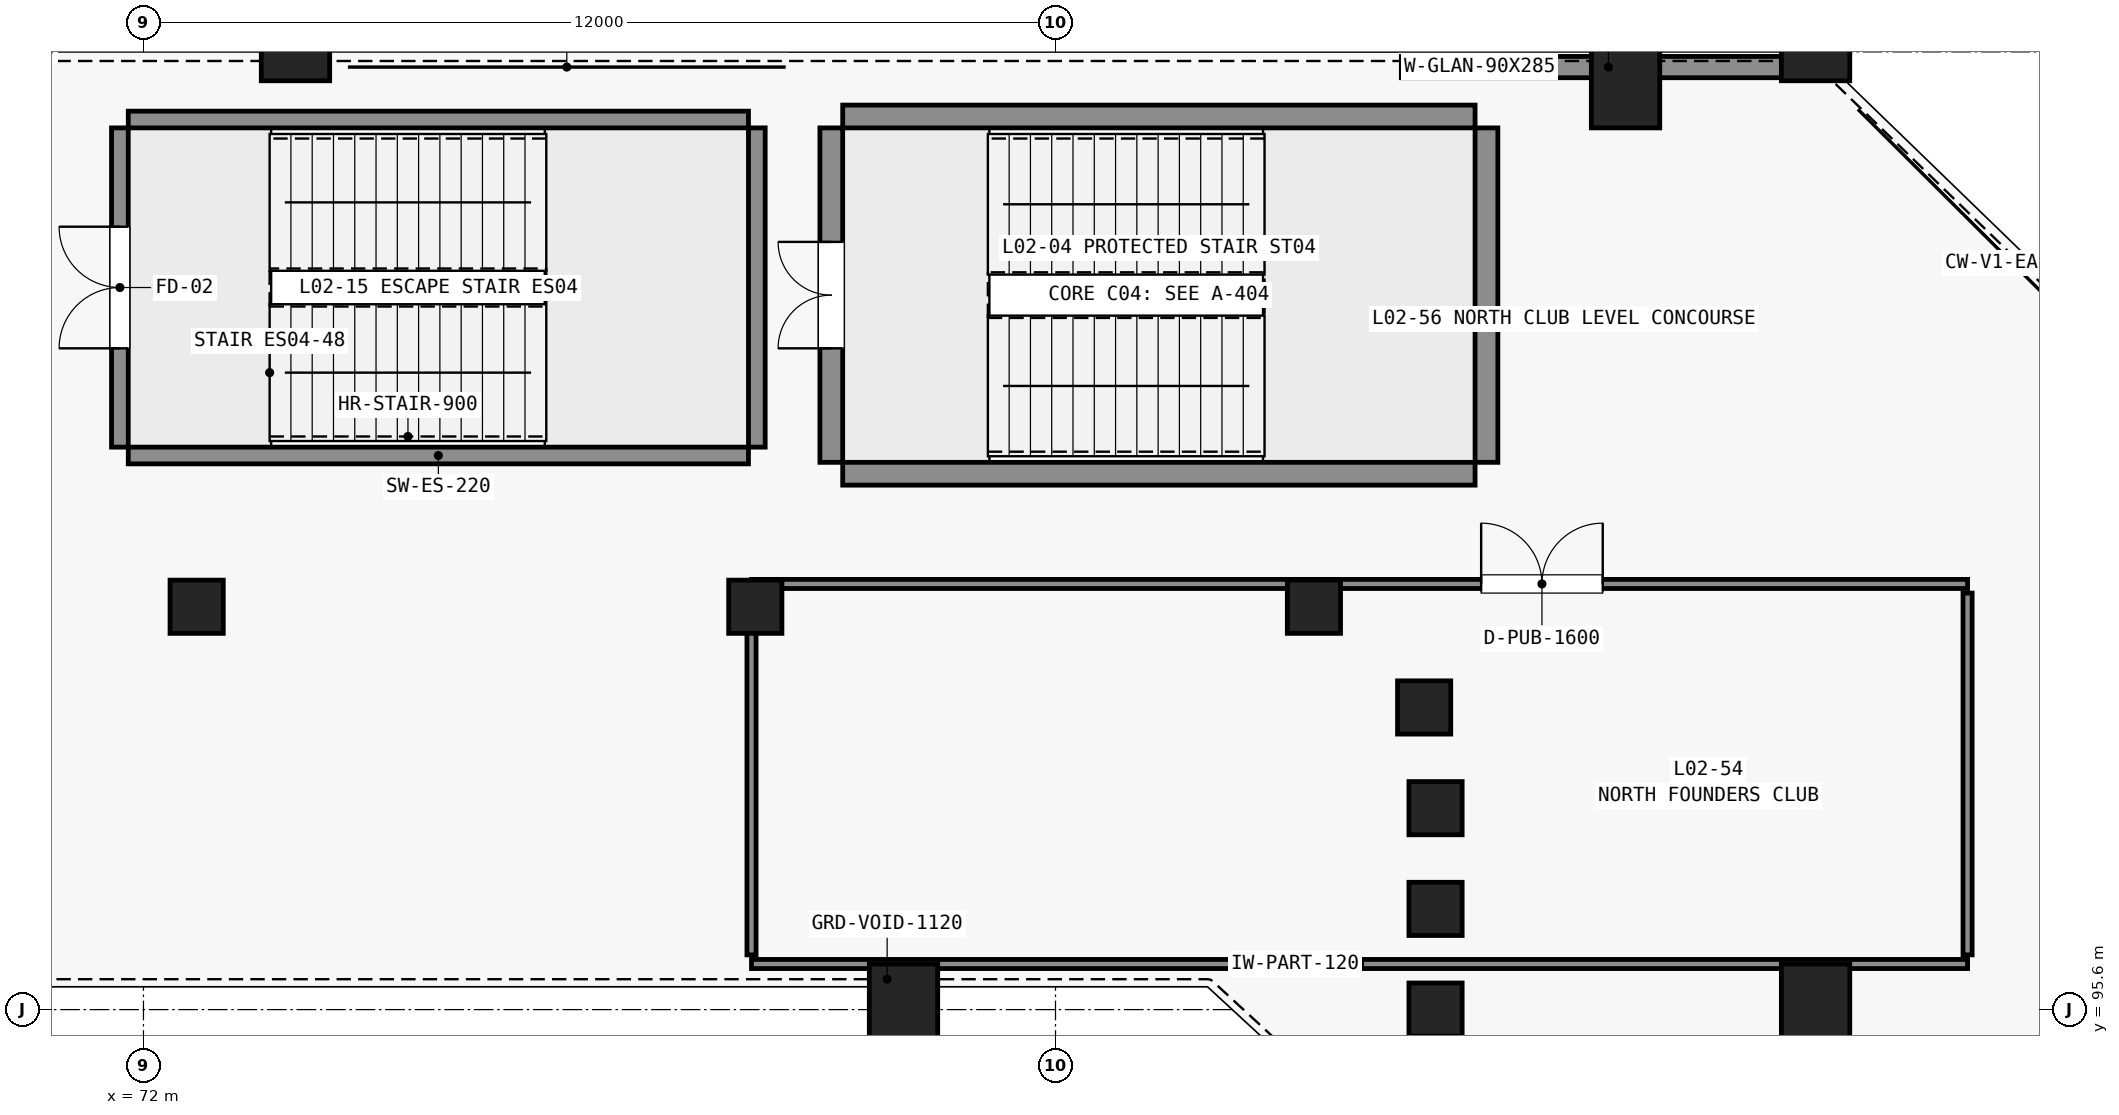
"""IFC4 building model, lengths in metres.
Left out: names, types, materials, properties, quantities, classifications, styles, units other than length and angle.
Written with IfcOpenShell. Run it as: python <this file> out.ifc"""

import sys

from ifc_helpers import new_model, si_unit, direction, frame, frame_2d, origin, origin_2d, place, context, subcontext, project, spatial, rectangle, extrude, element, fill, save


model = new_model("IFC4")
c1 = context("Model", 3, precision=1e-05, world=origin(), true_north=direction((0.0, 1.0)))
c2 = subcontext(c1, "Body", "Model", "MODEL_VIEW")
j1 = project(units=[si_unit("LENGTHUNIT", "METRE"), si_unit("PLANEANGLEUNIT", "RADIAN")], contexts=[c1])
p1 = place(None, origin())
s1 = spatial("IfcSite", under=j1, at=p1, CompositionType="ELEMENT")
p2 = place(p1, origin())
s2 = spatial("IfcBuilding", under=s1, at=p2, CompositionType="ELEMENT")
p3 = place(p2, frame((0.0, 0.0, 11.4)))
s3 = spatial("IfcBuildingStorey", under=s2, at=p3, CompositionType="ELEMENT", Elevation=11.4)
p4 = place(p3, frame((82.0, 95.6, 0.0), z_axis=(0.0, 0.0, 1.0), x_axis=(1.0, 0.0, 0.0)))
e1 = element("IfcColumn", 1, at=p4, inside=s3, PredefinedType="COLUMN", context=c2, shape_type="SweptSolid", body=[
    extrude(rectangle(XDim=0.9, YDim=1.2, at=origin_2d()), origin(), (0.0, 0.0, 1.0), 4.45),
])
p5 = place(p3, frame((94.0, 95.6, 0.0), z_axis=(0.0, 0.0, 1.0), x_axis=(1.0, 0.0, 0.0)))
e2 = element("IfcColumn", 2, at=p5, inside=s3, PredefinedType="COLUMN", context=c2, shape_type="SweptSolid", body=[
    extrude(rectangle(XDim=0.9, YDim=1.2, at=origin_2d()), origin(), (0.0, 0.0, 1.0), 4.8),
])
for number, where, z_axis, x_axis in (
    (3, (91.5, 107.8, 0.0), (0.0, 0.0, 1.0), (1.0, 0.0, 0.0)),
    (4, (74.0, 108.42, 0.0), (0.0, 0.0, 1.0), (1.0, 0.0, 0.0)),
    (5, (94.0, 108.42, 0.0), (0.0, 0.0, 1.0), (1.0, 0.0, 0.0)),
):
    element("IfcColumn", number, at=place(p3, frame(where, z_axis=z_axis, x_axis=x_axis)), inside=s3, PredefinedType="PILASTER", context=c2, shape_type="SweptSolid", body=[
        extrude(rectangle(XDim=0.9, YDim=1.2, at=origin_2d()), origin(), (0.0, 0.0, 1.0), 4.8),
    ])
for number, where, z_axis, x_axis in (
    (6, (81.2, 102.65, 0.0), (0.0, 0.0, 1.0), (1.0, 0.0, 0.0)),
    (7, (81.2, 107.35, 0.0), (0.0, 0.0, 1.0), (1.0, 0.0, 0.0)),
):
    element("IfcWall", number, at=place(p3, frame(where, z_axis=z_axis, x_axis=x_axis)), inside=s3, PredefinedType="SHEAR", context=c2, shape_type="SweptSolid", body=[
        extrude(rectangle(XDim=8.32, YDim=0.3, at=frame_2d((4.16, 0.0))), origin(), (0.0, 0.0, 1.0), 4.8),
    ])
p6 = place(p3, frame((81.05, 102.8, 0.0), z_axis=(0.0, 0.0, 1.0), x_axis=(0.0, 1.0, 0.0)))
e8 = element("IfcWall", 8, at=p6, inside=s3, PredefinedType="SHEAR", context=c2, shape_type="SweptSolid", body=[
    extrude(rectangle(XDim=4.4, YDim=0.3, at=frame_2d((2.2, 0.0))), origin(), (0.0, 0.0, 1.0), 4.8),
])
p7 = place(p6, frame((1.5, 0.0, 0.0)))
e9 = element("IfcOpeningElement", 9, at=p7, cuts=e8, PredefinedType="OPENING", context=c2, shape_type="SweptSolid", body=[
    extrude(rectangle(XDim=1.4, YDim=2.2, at=frame_2d((0.7, 1.1))), frame((0.0, 0.16, 0.0), z_axis=(0.0, -1.0, 0.0), x_axis=(1.0, 0.0, 0.0)), (0.0, 0.0, 1.0), 0.32),
])
p8 = place(p3, frame((89.67, 102.8, 0.0), z_axis=(0.0, 0.0, 1.0), x_axis=(0.0, 1.0, 0.0)))
e10 = element("IfcWall", 10, at=p8, inside=s3, PredefinedType="SHEAR", context=c2, shape_type="SweptSolid", body=[
    extrude(rectangle(XDim=4.4, YDim=0.3, at=frame_2d((2.2, 0.0))), origin(), (0.0, 0.0, 1.0), 4.8),
])
for number, where, z_axis, x_axis in (
    (11, (89.0, 95.6, 0.0), (0.0, 0.0, 1.0), (1.0, 0.0, 0.0)),
    (12, (89.0, 96.925, 0.0), (0.0, 0.0, 1.0), (1.0, 0.0, 0.0)),
    (13, (89.0, 98.25, 0.0), (0.0, 0.0, 1.0), (1.0, 0.0, 0.0)),
    (14, (88.85, 99.575, 0.0), (0.0, 0.0, 1.0), (1.0, 0.0, 0.0)),
    (15, (87.4, 100.9, 0.0), (0.0, 0.0, 1.0), (1.0, 0.0, 0.0)),
    (16, (80.05, 100.9, 0.0), (0.0, 0.0, 1.0), (1.0, 0.0, 0.0)),
    (17, (72.7, 100.9, 0.0), (0.0, 0.0, 1.0), (1.0, 0.0, 0.0)),
):
    element("IfcColumn", number, at=place(p3, frame(where, z_axis=z_axis, x_axis=x_axis)), inside=s3, PredefinedType="COLUMN", context=c2, shape_type="SweptSolid", body=[
        extrude(rectangle(XDim=0.7, YDim=0.7, at=origin_2d()), origin(), (0.0, 0.0, 1.0), 4.8),
    ])
p9 = place(p3, frame((88.55, 108.0, 0.0), z_axis=(0.0, 0.0, 1.0), x_axis=(1.0, 0.0, 0.0)))
e18 = element("IfcWall", 18, at=p9, inside=s3, PredefinedType="STANDARD", context=c2, shape_type="SweptSolid", body=[
    extrude(rectangle(XDim=5.45, YDim=0.28, at=frame_2d((2.725, 0.0))), origin(), (0.0, 0.0, 1.0), 4.45),
])
p10 = place(p9, frame((1.1, 0.0, 0.95)))
e19 = element("IfcOpeningElement", 19, at=p10, cuts=e18, PredefinedType="OPENING", context=c2, shape_type="SweptSolid", body=[
    extrude(rectangle(XDim=0.9, YDim=2.85, at=frame_2d((0.45, 1.425))), frame((0.0, 0.15, 0.0), z_axis=(0.0, -1.0, 0.0), x_axis=(1.0, 0.0, 0.0)), (0.0, 0.0, 1.0), 0.3),
])
for number, where, z_axis, x_axis in (
    (20, (71.8, 102.89, 0.0), (0.0, 0.0, 1.0), (1.0, 0.0, 0.0)),
    (21, (71.8, 107.31, 0.0), (0.0, 0.0, 1.0), (1.0, 0.0, 0.0)),
):
    element("IfcWall", number, at=place(p3, frame(where, z_axis=z_axis, x_axis=x_axis)), inside=s3, PredefinedType="SHEAR", context=c2, shape_type="SweptSolid", body=[
        extrude(rectangle(XDim=8.16, YDim=0.22, at=frame_2d((4.08, 0.0))), origin(), (0.0, 0.0, 1.0), 4.8),
    ])
p11 = place(p3, frame((71.69, 103.0, 0.0), z_axis=(0.0, 0.0, 1.0), x_axis=(0.0, 1.0, 0.0)))
e22 = element("IfcWall", 22, at=p11, inside=s3, PredefinedType="SHEAR", context=c2, shape_type="SweptSolid", body=[
    extrude(rectangle(XDim=4.2, YDim=0.22, at=frame_2d((2.1, 0.0))), origin(), (0.0, 0.0, 1.0), 4.8),
])
p12 = place(p11, frame((1.3, 0.0, 0.0)))
e23 = element("IfcOpeningElement", 23, at=p12, cuts=e22, PredefinedType="OPENING", context=c2, shape_type="SweptSolid", body=[
    extrude(rectangle(XDim=1.6, YDim=2.2, at=frame_2d((0.8, 1.1))), frame((0.0, 0.12, 0.0), z_axis=(0.0, -1.0, 0.0), x_axis=(1.0, 0.0, 0.0)), (0.0, 0.0, 1.0), 0.24),
])
p13 = place(p3, frame((80.07, 103.0, 0.0), z_axis=(0.0, 0.0, 1.0), x_axis=(0.0, 1.0, 0.0)))
e24 = element("IfcWall", 24, at=p13, inside=s3, PredefinedType="SHEAR", context=c2, shape_type="SweptSolid", body=[
    extrude(rectangle(XDim=4.2, YDim=0.22, at=frame_2d((2.1, 0.0))), origin(), (0.0, 0.0, 1.0), 4.8),
])
p14 = place(p3, frame((80.0, 96.2, 0.0), z_axis=(0.0, 0.0, 1.0), x_axis=(1.0, 0.0, 0.0)))
e25 = element("IfcWall", 25, at=p14, inside=s3, PredefinedType="PARTITIONING", context=c2, shape_type="SweptSolid", body=[
    extrude(rectangle(XDim=16.0, YDim=0.12, at=frame_2d((8.0, 0.0))), origin(), (0.0, 0.0, 1.0), 4.45),
])
p15 = place(p3, frame((80.0, 101.2, 0.0), z_axis=(0.0, 0.0, 1.0), x_axis=(1.0, 0.0, 0.0)))
e26 = element("IfcWall", 26, at=p15, inside=s3, PredefinedType="PARTITIONING", context=c2, shape_type="SweptSolid", body=[
    extrude(rectangle(XDim=16.0, YDim=0.12, at=frame_2d((8.0, 0.0))), origin(), (0.0, 0.0, 1.0), 4.45),
])
p16 = place(p15, frame((9.6, 0.0, 0.0)))
e27 = element("IfcOpeningElement", 27, at=p16, cuts=e26, PredefinedType="OPENING", context=c2, shape_type="SweptSolid", body=[
    extrude(rectangle(XDim=1.6, YDim=2.25, at=frame_2d((0.8, 1.125))), frame((0.0, 0.07, 0.0), z_axis=(0.0, -1.0, 0.0), x_axis=(1.0, 0.0, 0.0)), (0.0, 0.0, 1.0), 0.14),
])
for number, where, z_axis, x_axis in (
    (28, (80.0, 96.32, 0.0), (0.0, 0.0, 1.0), (0.0, 1.0, 0.0)),
    (29, (96.0, 96.32, 0.0), (0.0, 0.0, 1.0), (0.0, 1.0, 0.0)),
):
    element("IfcWall", number, at=place(p3, frame(where, z_axis=z_axis, x_axis=x_axis)), inside=s3, PredefinedType="PARTITIONING", context=c2, shape_type="SweptSolid", body=[
        extrude(rectangle(XDim=4.76, YDim=0.12, at=frame_2d((2.38, 0.0))), origin(), (0.0, 0.0, 1.0), 4.45),
    ])
p17 = place(p10, origin())
e30 = element("IfcWindow", 30, at=p17, inside=s3, PartitioningType="DOUBLE_PANEL_VERTICAL", PredefinedType="WINDOW", context=c2, shape_type="SweptSolid", body=[
    extrude(rectangle(XDim=0.9, YDim=2.85, at=frame_2d((0.45, 1.425))), frame((0.0, 0.03, 0.0), z_axis=(0.0, -1.0, 0.0), x_axis=(1.0, 0.0, 0.0)), (0.0, 0.0, 1.0), 0.06),
])
fill(e19, e30)
p18 = place(p7, origin())
e31 = element("IfcDoor", 31, at=p18, inside=s3, OperationType="DOUBLE_DOOR_SINGLE_SWING", PredefinedType="DOOR", context=c2, shape_type="SweptSolid", body=[
    extrude(rectangle(XDim=1.4, YDim=2.2, at=frame_2d((0.7, 1.1))), frame((0.0, 0.025, 0.0), z_axis=(0.0, -1.0, 0.0), x_axis=(1.0, 0.0, 0.0)), (0.0, 0.0, 1.0), 0.05),
])
fill(e9, e31)
p19 = place(p12, origin())
e32 = element("IfcDoor", 32, at=p19, inside=s3, OperationType="DOUBLE_DOOR_SINGLE_SWING", PredefinedType="DOOR", context=c2, shape_type="SweptSolid", body=[
    extrude(rectangle(XDim=1.6, YDim=2.2, at=frame_2d((0.8, 1.1))), frame((0.0, 0.025, 0.0), z_axis=(0.0, -1.0, 0.0), x_axis=(1.0, 0.0, 0.0)), (0.0, 0.0, 1.0), 0.05),
])
fill(e23, e32)
p20 = place(p16, origin())
e33 = element("IfcDoor", 33, at=p20, inside=s3, OperationType="DOUBLE_DOOR_SINGLE_SWING", PredefinedType="DOOR", context=c2, shape_type="SweptSolid", body=[
    extrude(rectangle(XDim=1.6, YDim=2.25, at=frame_2d((0.8, 1.125))), frame((0.0, 0.025, 0.0), z_axis=(0.0, -1.0, 0.0), x_axis=(1.0, 0.0, 0.0)), (0.0, 0.0, 1.0), 0.05),
])
fill(e27, e33)
save(model, sys.argv[1])
